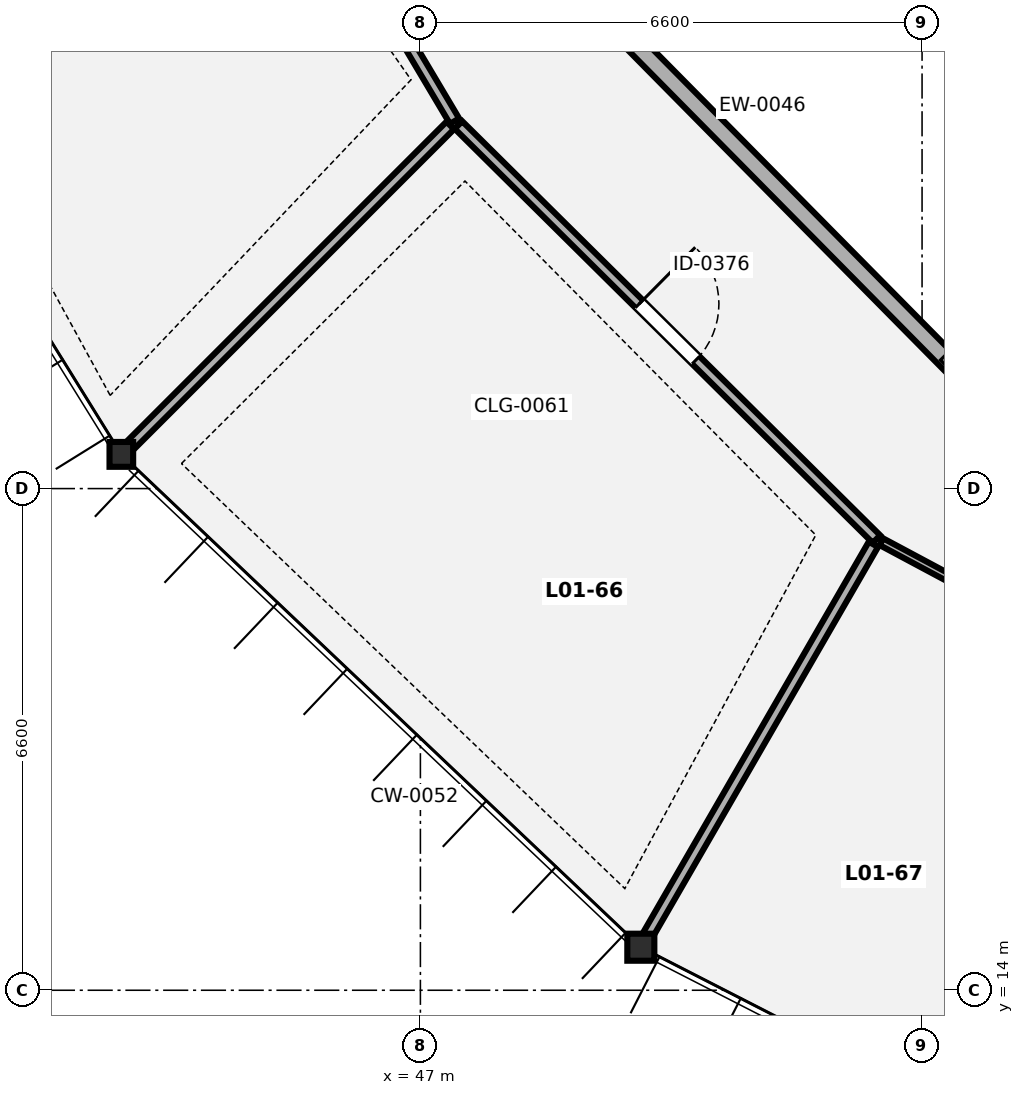
"""IFC4 building model, lengths in metres.
Left out: names, types, materials, properties, quantities, classifications, styles, units other than length and angle.
Written with IfcOpenShell. Run it as: python <this file> out.ifc"""

import sys

from ifc_helpers import new_model, si_unit, direction, frame, frame_2d, origin, origin_2d, place, context, subcontext, project, spatial, rectangle, hollow_circle, i_section, extrude, element, fill, save


model = new_model("IFC4")
c1 = context("Model", 3, precision=1e-05, world=origin(), true_north=direction((0.0, 1.0)))
c2 = subcontext(c1, "Body", "Model", "MODEL_VIEW")
j1 = project(units=[si_unit("LENGTHUNIT", "METRE"), si_unit("PLANEANGLEUNIT", "RADIAN")], contexts=[c1])
p1 = place(None, origin())
s1 = spatial("IfcSite", under=j1, at=p1, CompositionType="ELEMENT")
p2 = place(p1, origin())
s2 = spatial("IfcBuilding", under=s1, at=p2, CompositionType="ELEMENT")
p3 = place(p2, frame((0.0, 0.0, 4.9)))
s3 = spatial("IfcBuildingStorey", under=s2, at=p3, CompositionType="ELEMENT", Elevation=4.9)
p4 = place(p3, frame((43.065, 21.05, 0.0), z_axis=(0.0, 0.0, 1.0), x_axis=(1.0, 0.0, 0.0)))
e1 = element("IfcColumn", 1, at=p4, inside=s3, PredefinedType="COLUMN", context=c2, shape_type="SweptSolid", body=[
    extrude(i_section(OverallWidth=0.311, OverallDepth=0.327, WebThickness=0.016, FlangeThickness=0.025, FilletRadius=0.017, at=origin_2d()), origin(), (0.0, 0.0, 1.0), 4.2),
])
p5 = place(p3, frame((49.9, 14.566, 0.0), z_axis=(0.0, 0.0, 1.0), x_axis=(1.0, 0.0, 0.0)))
e2 = element("IfcColumn", 2, at=p5, inside=s3, PredefinedType="COLUMN", context=c2, shape_type="SweptSolid", body=[
    extrude(hollow_circle(Radius=0.178, WallThickness=0.013, at=origin_2d()), origin(), (0.0, 0.0, 1.0), 4.2),
])
p6 = place(p3, frame((49.299, 26.977, 0.0), z_axis=(0.0, 0.0, 1.0), x_axis=(0.702651385176, -0.711534279505, 0.0)))
e3 = element("IfcWall", 3, at=p6, inside=s3, PredefinedType="SOLIDWALL", context=c2, shape_type="SweptSolid", body=[
    extrude(rectangle(XDim=6.761, YDim=0.24, at=frame_2d((3.381, 0.0))), origin(), (0.0, 0.0, 1.0), 3.65),
])
p7 = place(p3, frame((43.191, 32.598, 0.0), z_axis=(0.0, 0.0, 1.0), x_axis=(0.510915698067, -0.859630821614, 0.0)))
e4 = element("IfcWall", 4, at=p7, inside=s3, PredefinedType="PARTITIONING", context=c2, shape_type="SweptSolid", body=[
    extrude(rectangle(XDim=8.334, YDim=0.14, at=frame_2d((4.167, 0.0))), origin(), (0.0, 0.0, 1.0), 3.98),
])
p8 = place(p3, frame((47.393, 25.377, 0.0), z_axis=(0.0, 0.0, 1.0), x_axis=(-0.707086637129, -0.70712692467, 0.0)))
e5 = element("IfcWall", 5, at=p8, inside=s3, PredefinedType="PARTITIONING", context=c2, shape_type="SweptSolid", body=[
    extrude(rectangle(XDim=6.06, YDim=0.14, at=frame_2d((3.03, 0.0))), origin(), (0.0, 0.0, 1.0), 3.392),
])
p9 = place(p3, frame((47.501, 25.383, 0.0), z_axis=(0.0, 0.0, 1.0), x_axis=(0.71042636545, -0.703771539119, 0.0)))
e6 = element("IfcWall", 6, at=p9, inside=s3, PredefinedType="PARTITIONING", context=c2, shape_type="SweptSolid", body=[
    extrude(rectangle(XDim=7.741, YDim=0.14, at=frame_2d((3.87, 0.0))), origin(), (0.0, 0.0, 1.0), 3.98),
])
p10 = place(p9, frame((3.345, 0.0, 0.0)))
e7 = element("IfcOpeningElement", 7, at=p10, cuts=e6, PredefinedType="OPENING", context=c2, shape_type="SweptSolid", body=[
    extrude(rectangle(XDim=1.05, YDim=2.15, at=frame_2d((0.525, 1.075))), frame((0.0, 0.08, 0.0), z_axis=(0.0, -1.0, 0.0), x_axis=(1.0, 0.0, 0.0)), (0.0, 0.0, 1.0), 0.16),
])
p11 = place(p3, frame((52.96, 19.866, 0.0), z_axis=(0.0, 0.0, 1.0), x_axis=(-0.500008418462, -0.866020543329, 0.0)))
e8 = element("IfcWall", 8, at=p11, inside=s3, PredefinedType="PARTITIONING", context=c2, shape_type="SweptSolid", body=[
    extrude(rectangle(XDim=6.06, YDim=0.14, at=frame_2d((3.03, 0.0))), origin(), (0.0, 0.0, 1.0), 3.313),
])
p12 = place(p3, frame((53.063, 19.902, 0.0), z_axis=(0.0, 0.0, 1.0), x_axis=(0.881826283139, -0.471574391125, 0.0)))
e9 = element("IfcWall", 9, at=p12, inside=s3, PredefinedType="PARTITIONING", context=c2, shape_type="SweptSolid", body=[
    extrude(rectangle(XDim=7.258, YDim=0.1, at=frame_2d((3.629, 0.0))), origin(), (0.0, 0.0, 1.0), 3.98),
])
p13 = place(p12, frame((3.129, 0.0, 0.0)))
e10 = element("IfcOpeningElement", 10, at=p13, cuts=e9, PredefinedType="OPENING", context=c2, shape_type="SweptSolid", body=[
    extrude(rectangle(XDim=1.0, YDim=2.1, at=frame_2d((0.5, 1.05))), frame((0.0, 0.06, 0.0), z_axis=(0.0, -1.0, 0.0), x_axis=(1.0, 0.0, 0.0)), (0.0, 0.0, 1.0), 0.12),
])
p14 = place(p10, origin())
e11 = element("IfcDoor", 11, at=p14, inside=s3, OperationType="SINGLE_SWING_LEFT", PredefinedType="DOOR", context=c2, shape_type="SweptSolid", body=[
    extrude(rectangle(XDim=1.05, YDim=2.15, at=frame_2d((0.525, 1.075))), frame((0.0, 0.025, 0.0), z_axis=(0.0, -1.0, 0.0), x_axis=(1.0, 0.0, 0.0)), (0.0, 0.0, 1.0), 0.05),
])
fill(e7, e11)
save(model, sys.argv[1])
